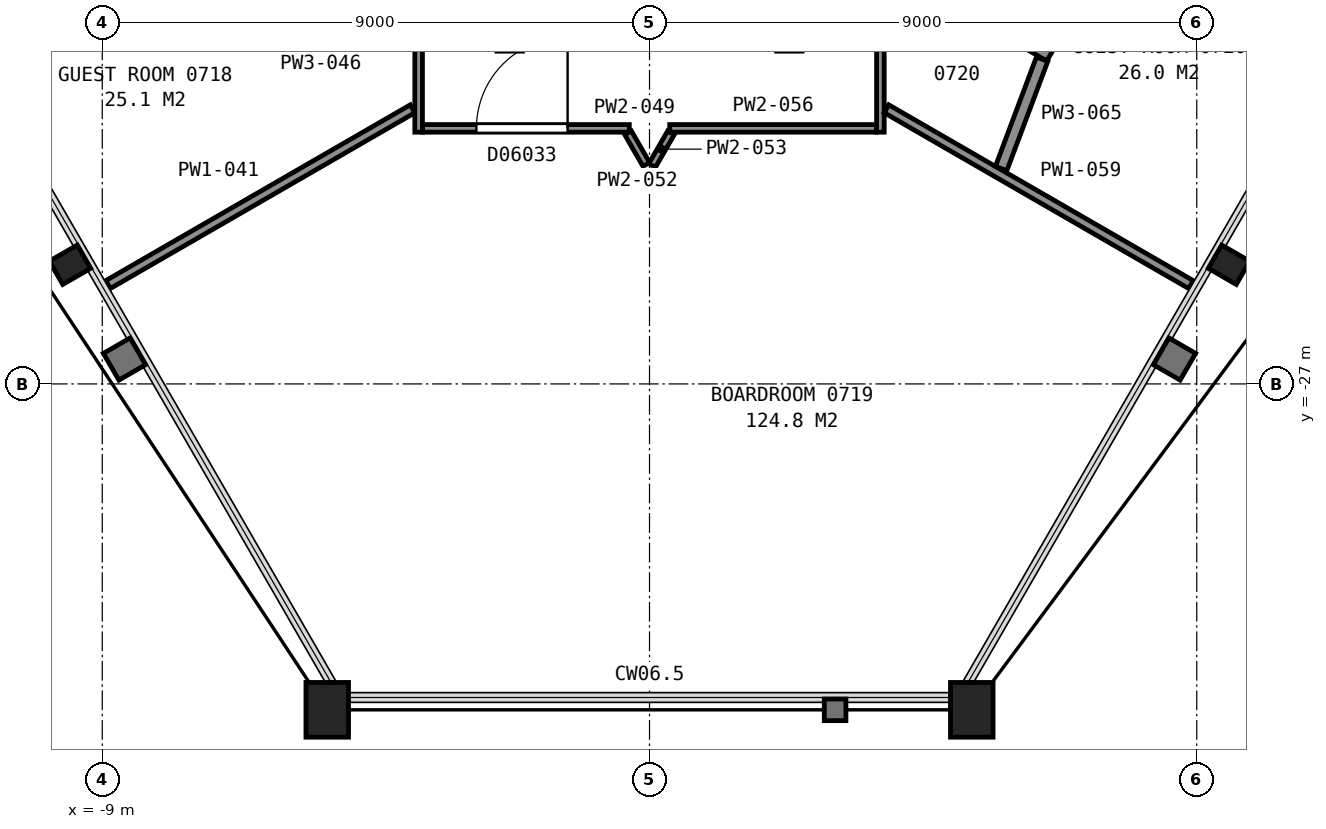
"""IFC4 building model, lengths in metres.
Left out: names, types, materials, properties, quantities, classifications, styles, units other than length and angle.
Written with IfcOpenShell. Run it as: python <this file> out.ifc"""

import sys

from ifc_helpers import new_model, si_unit, direction, frame, frame_2d, origin, origin_2d, place, context, subcontext, project, spatial, rectangle, hollow_rectangle, i_section, extrude, element, fill, save


model = new_model("IFC4")
c1 = context("Model", 3, precision=1e-05, world=origin(), true_north=direction((0.0, 1.0)))
c2 = subcontext(c1, "Body", "Model", "MODEL_VIEW")
j1 = project(units=[si_unit("LENGTHUNIT", "METRE"), si_unit("PLANEANGLEUNIT", "RADIAN")], contexts=[c1])
p1 = place(None, origin())
s1 = spatial("IfcSite", under=j1, at=p1, CompositionType="ELEMENT")
p2 = place(p1, origin())
s2 = spatial("IfcBuilding", under=s1, at=p2, CompositionType="ELEMENT")
p3 = place(p2, frame((0.0, 0.0, 40.4)))
s3 = spatial("IfcBuildingStorey", under=s2, at=p3, CompositionType="ELEMENT", Elevation=40.4)
p4 = place(p3, frame((-9.53, -25.04, 0.0), z_axis=(0.0, 0.0, 1.0), x_axis=(-0.5, 0.866025403784, 0.0)))
e1 = element("IfcColumn", 1, at=p4, inside=s3, PredefinedType="COLUMN", context=c2, shape_type="SweptSolid", body=[
    extrude(i_section(OverallWidth=0.442, OverallDepth=0.531, WebThickness=0.066, FlangeThickness=0.106, FilletRadius=0.015, at=origin_2d()), origin(), (0.0, 0.0, 1.0), 3.575),
])
for number, where, z_axis, x_axis in (
    (2, (-5.3, -32.36, 0.0), (0.0, 0.0, 1.0), (-1.0, 0.0, 0.0)),
    (3, (5.3, -32.36, 0.0), (0.0, 0.0, 1.0), (-1.0, 0.0, 0.0)),
):
    element("IfcColumn", number, at=place(p3, frame(where, z_axis=z_axis, x_axis=x_axis)), inside=s3, PredefinedType="COLUMN", context=c2, shape_type="SweptSolid", body=[
        extrude(hollow_rectangle(XDim=0.7, YDim=0.9, WallThickness=0.065, at=origin_2d()), origin(), (0.0, 0.0, 1.0), 3.56),
    ])
p5 = place(p3, frame((9.53, -25.04, 0.0), z_axis=(0.0, 0.0, 1.0), x_axis=(-0.5, -0.866025403784, 0.0)))
e4 = element("IfcColumn", 4, at=p5, inside=s3, PredefinedType="COLUMN", context=c2, shape_type="SweptSolid", body=[
    extrude(i_section(OverallWidth=0.442, OverallDepth=0.531, WebThickness=0.066, FlangeThickness=0.106, FilletRadius=0.015, at=origin_2d()), origin(), (0.0, 0.0, 1.0), 3.575),
])
p6 = place(p3, frame((-8.905, -25.366, 0.0), z_axis=(0.0, 0.0, 1.0), x_axis=(0.866025977343, 0.499999006567, 0.0)))
e5 = element("IfcWall", 5, at=p6, inside=s3, PredefinedType="PARTITIONING", context=c2, shape_type="SweptSolid", body=[
    extrude(rectangle(XDim=5.782, YDim=0.15, at=frame_2d((2.891, 0.0))), origin(), (0.0, 0.0, 1.0), 2.613),
])
p7 = place(p3, frame((-3.797, -22.86, 0.0), z_axis=(0.0, 0.0, 1.0), x_axis=(0.0, 1.0, 0.0)))
e6 = element("IfcWall", 6, at=p7, inside=s3, PredefinedType="PARTITIONING", context=c2, shape_type="SweptSolid", body=[
    extrude(rectangle(XDim=5.871, YDim=0.125, at=frame_2d((2.935, 0.0))), origin(), (0.0, 0.0, 1.0), 2.613),
])
p8 = place(p7, frame((1.442, 0.0, 0.0)))
e7 = element("IfcOpeningElement", 7, at=p8, cuts=e6, PredefinedType="OPENING", context=c2, shape_type="SweptSolid", body=[
    extrude(rectangle(XDim=0.9, YDim=2.1, at=frame_2d((0.45, 1.05))), frame((0.0, 0.073, 0.0), z_axis=(0.0, -1.0, 0.0), x_axis=(1.0, 0.0, 0.0)), (0.0, 0.0, 1.0), 0.145),
])
p9 = place(p3, frame((-0.333, -22.797, 0.0), z_axis=(0.0, 0.0, 1.0), x_axis=(-1.0, 0.0, 0.0)))
e8 = element("IfcWall", 8, at=p9, inside=s3, PredefinedType="PARTITIONING", context=c2, shape_type="SweptSolid", body=[
    extrude(rectangle(XDim=3.399, YDim=0.125, at=frame_2d((1.7, 0.0))), origin(), (0.0, 0.0, 1.0), 2.613),
])
p10 = place(p9, frame((1.014, 0.0, 0.0)))
e9 = element("IfcOpeningElement", 9, at=p10, cuts=e8, PredefinedType="OPENING", context=c2, shape_type="SweptSolid", body=[
    extrude(rectangle(XDim=1.5, YDim=2.1, at=frame_2d((0.75, 1.05))), frame((0.0, 0.073, 0.0), z_axis=(0.0, -1.0, 0.0), x_axis=(1.0, 0.0, 0.0)), (0.0, 0.0, 1.0), 0.145),
])
p11 = place(p3, frame((-0.353, -22.871, 0.0), z_axis=(0.0, 0.0, 1.0), x_axis=(0.499863517517, -0.866104187645, 0.0)))
e10 = element("IfcWall", 10, at=p11, inside=s3, PredefinedType="PARTITIONING", context=c2, shape_type="SweptSolid", body=[
    extrude(rectangle(XDim=0.599, YDim=0.125, at=frame_2d((0.3, 0.0))), origin(), (0.0, 0.0, 1.0), 2.613),
])
p12 = place(p3, frame((0.043, -23.407, 0.0), z_axis=(0.0, 0.0, 1.0), x_axis=(0.499870333213, 0.866100253997, 0.0)))
e11 = element("IfcWall", 11, at=p12, inside=s3, PredefinedType="PARTITIONING", context=c2, shape_type="SweptSolid", body=[
    extrude(rectangle(XDim=0.619, YDim=0.125, at=frame_2d((0.31, 0.0))), origin(), (0.0, 0.0, 1.0), 2.613),
])
p13 = place(p3, frame((0.333, -22.797, 0.0), z_axis=(0.0, 0.0, 1.0), x_axis=(1.0, 0.0, 0.0)))
e12 = element("IfcWall", 12, at=p13, inside=s3, PredefinedType="PARTITIONING", context=c2, shape_type="SweptSolid", body=[
    extrude(rectangle(XDim=3.399, YDim=0.125, at=frame_2d((1.7, 0.0))), origin(), (0.0, 0.0, 1.0), 2.613),
])
p14 = place(p3, frame((3.797, -16.989, 0.0), z_axis=(0.0, 0.0, 1.0), x_axis=(0.0, -1.0, 0.0)))
e13 = element("IfcWall", 13, at=p14, inside=s3, PredefinedType="PARTITIONING", context=c2, shape_type="SweptSolid", body=[
    extrude(rectangle(XDim=5.871, YDim=0.125, at=frame_2d((2.935, 0.0))), origin(), (0.0, 0.0, 1.0), 2.613),
])
p15 = place(p14, frame((1.103, 0.0, 0.0)))
e14 = element("IfcOpeningElement", 14, at=p15, cuts=e13, PredefinedType="OPENING", context=c2, shape_type="SweptSolid", body=[
    extrude(rectangle(XDim=0.9, YDim=2.1, at=frame_2d((0.45, 1.05))), frame((0.0, 0.073, 0.0), z_axis=(0.0, -1.0, 0.0), x_axis=(1.0, 0.0, 0.0)), (0.0, 0.0, 1.0), 0.145),
])
p16 = place(p3, frame((3.897, -22.475, 0.0), z_axis=(0.0, 0.0, 1.0), x_axis=(0.866025977343, -0.499999006567, 0.0)))
e15 = element("IfcWall", 15, at=p16, inside=s3, PredefinedType="PARTITIONING", context=c2, shape_type="SweptSolid", body=[
    extrude(rectangle(XDim=5.782, YDim=0.15, at=frame_2d((2.891, 0.0))), origin(), (0.0, 0.0, 1.0), 2.613),
])
p17 = place(p3, frame((6.583, -21.601, 0.0), z_axis=(0.0, 0.0, 1.0), x_axis=(-0.865981493415, 0.500076047279, 0.0)))
e16 = element("IfcWall", 16, at=p17, inside=s3, PredefinedType="PARTITIONING", context=c2, shape_type="SweptSolid", body=[
    extrude(rectangle(XDim=3.088, YDim=0.2, at=frame_2d((1.544, 0.0))), origin(), (0.0, 0.0, 1.0), 2.613),
])
p18 = place(p17, frame((1.268, 0.0, 0.0)))
e17 = element("IfcOpeningElement", 17, at=p18, cuts=e16, PredefinedType="OPENING", context=c2, shape_type="SweptSolid", body=[
    extrude(rectangle(XDim=0.8, YDim=2.1, at=frame_2d((0.4, 1.05))), frame((0.0, 0.11, 0.0), z_axis=(0.0, -1.0, 0.0), x_axis=(1.0, 0.0, 0.0)), (0.0, 0.0, 1.0), 0.22),
])
p19 = place(p3, frame((5.782, -23.457, 0.0), z_axis=(0.0, 0.0, 1.0), x_axis=(0.350942351116, 0.936397066523, 0.0)))
e18 = element("IfcWall", 18, at=p19, inside=s3, PredefinedType="PARTITIONING", context=c2, shape_type="SweptSolid", body=[
    extrude(rectangle(XDim=1.921, YDim=0.2, at=frame_2d((0.96, 0.0))), origin(), (0.0, 0.0, 1.0), 2.613),
])
p20 = place(p10, origin())
e19 = element("IfcDoor", 19, at=p20, inside=s3, OperationType="DOUBLE_DOOR_SINGLE_SWING", PredefinedType="DOOR", context=c2, shape_type="SweptSolid", body=[
    extrude(rectangle(XDim=1.5, YDim=2.1, at=frame_2d((0.75, 1.05))), frame((0.0, 0.025, 0.0), z_axis=(0.0, -1.0, 0.0), x_axis=(1.0, 0.0, 0.0)), (0.0, 0.0, 1.0), 0.05),
])
fill(e9, e19)
save(model, sys.argv[1])
